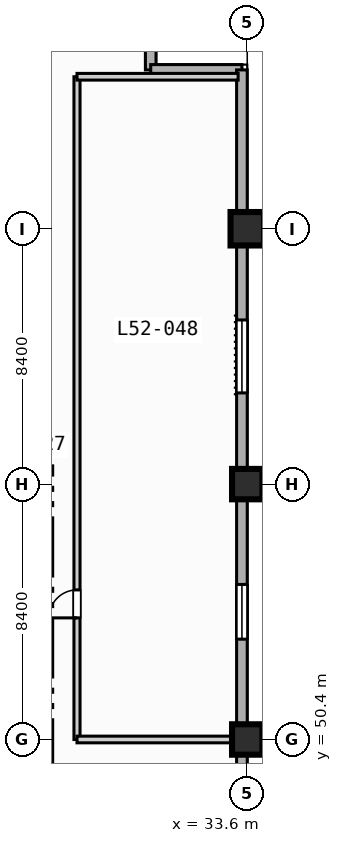
"""IFC4 building model, lengths in metres.
Left out: names, types, materials, properties, quantities, classifications, styles, units other than length and angle.
Written with IfcOpenShell. Run it as: python <this file> out.ifc"""

import sys

from ifc_helpers import new_model, si_unit, direction, frame, frame_2d, origin, origin_2d, place, context, subcontext, project, spatial, rectangle, extrude, element, fill, save


model = new_model("IFC4")
c1 = context("Model", 3, precision=1e-05, world=origin(), true_north=direction((0.0, 1.0)))
c2 = subcontext(c1, "Body", "Model", "MODEL_VIEW")
j1 = project(units=[si_unit("LENGTHUNIT", "METRE"), si_unit("PLANEANGLEUNIT", "RADIAN")], contexts=[c1])
p1 = place(None, origin())
s1 = spatial("IfcSite", under=j1, at=p1, CompositionType="ELEMENT")
p2 = place(p1, origin())
s2 = spatial("IfcBuilding", under=s1, at=p2, CompositionType="ELEMENT")
p3 = place(p2, frame((0.0, 0.0, 212.4)))
s3 = spatial("IfcBuildingStorey", under=s2, at=p3, CompositionType="ELEMENT", Elevation=212.4)
for number, where, z_axis, x_axis in (
    (1, (33.6, 50.4, 0.0), (0.0, 0.0, 1.0), (1.0, 0.0, 0.0)),
    (2, (33.6, 58.8, 0.0), (0.0, 0.0, 1.0), (1.0, 0.0, 0.0)),
):
    element("IfcColumn", number, at=place(p3, frame(where, z_axis=z_axis, x_axis=x_axis)), inside=s3, PredefinedType="COLUMN", context=c2, shape_type="SweptSolid", body=[
        extrude(rectangle(XDim=1.0, YDim=1.0, at=origin_2d()), origin(), (0.0, 0.0, 1.0), 3.7),
    ])
p4 = place(p3, frame((33.6, 67.2, 0.0), z_axis=(0.0, 0.0, 1.0), x_axis=(1.0, 0.0, 0.0)))
e3 = element("IfcColumn", 3, at=p4, inside=s3, PredefinedType="COLUMN", context=c2, shape_type="SweptSolid", body=[
    extrude(rectangle(XDim=1.1, YDim=1.1, at=origin_2d()), origin(), (0.0, 0.0, 1.0), 3.7),
])
for number, where, z_axis, x_axis in (
    (4, (30.425, 75.425, 0.0), (0.0, 0.0, 1.0), (0.0, -1.0, 0.0)),
    (5, (30.425, 72.425, 0.0), (0.0, 0.0, 1.0), (1.0, 0.0, 0.0)),
):
    element("IfcWall", number, at=place(p3, frame(where, z_axis=z_axis, x_axis=x_axis)), inside=s3, PredefinedType="STANDARD", context=c2, shape_type="SweptSolid", body=[
        extrude(rectangle(XDim=3.0, YDim=0.35, at=frame_2d((1.5, 0.0))), origin(), (0.0, 0.0, 1.0), 3.47),
    ])
p5 = place(p3, frame((33.425, 72.425, 0.0), z_axis=(0.0, 0.0, 1.0), x_axis=(0.0, -1.0, 0.0)))
e6 = element("IfcWall", 6, at=p5, inside=s3, PredefinedType="STANDARD", context=c2, shape_type="SweptSolid", body=[
    extrude(rectangle(XDim=39.0, YDim=0.35, at=frame_2d((19.5, 0.0))), origin(), (0.0, 0.0, 1.0), 3.47),
])
p6 = place(p5, frame((33.725, 0.0, 0.85)))
e7 = element("IfcOpeningElement", 7, at=p6, cuts=e6, PredefinedType="OPENING", context=c2, shape_type="SweptSolid", body=[
    extrude(rectangle(XDim=1.8, YDim=1.8, at=frame_2d((0.9, 0.9))), frame((0.0, 0.185, 0.0), z_axis=(0.0, -1.0, 0.0), x_axis=(1.0, 0.0, 0.0)), (0.0, 0.0, 1.0), 0.37),
])
p7 = place(p5, frame((16.925, 0.0, 0.85)))
e8 = element("IfcOpeningElement", 8, at=p7, cuts=e6, PredefinedType="OPENING", context=c2, shape_type="SweptSolid", body=[
    extrude(rectangle(XDim=1.8, YDim=1.8, at=frame_2d((0.9, 0.9))), frame((0.0, 0.185, 0.0), z_axis=(0.0, -1.0, 0.0), x_axis=(1.0, 0.0, 0.0)), (0.0, 0.0, 1.0), 0.37),
])
p8 = place(p5, frame((8.225, 0.0, 0.85)))
e9 = element("IfcOpeningElement", 9, at=p8, cuts=e6, PredefinedType="OPENING", context=c2, shape_type="SweptSolid", body=[
    extrude(rectangle(XDim=2.4, YDim=1.95, at=frame_2d((1.2, 0.975))), frame((0.0, 0.185, 0.0), z_axis=(0.0, -1.0, 0.0), x_axis=(1.0, 0.0, 0.0)), (0.0, 0.0, 1.0), 0.37),
])
p9 = place(p3, frame((28.0, 50.4, 0.0), z_axis=(0.0, 0.0, 1.0), x_axis=(0.0, 1.0, 0.0)))
e10 = element("IfcWall", 10, at=p9, inside=s3, PredefinedType="PARTITIONING", context=c2, shape_type="SweptSolid", body=[
    extrude(rectangle(XDim=21.8, YDim=0.2, at=frame_2d((10.9, 0.0))), origin(), (0.0, 0.0, 1.0), 3.47),
])
p10 = place(p9, frame((4.0, 0.0, 0.0)))
e11 = element("IfcOpeningElement", 11, at=p10, cuts=e10, PredefinedType="OPENING", context=c2, shape_type="SweptSolid", body=[
    extrude(rectangle(XDim=0.92, YDim=2.1, at=frame_2d((0.46, 1.05))), frame((0.0, 0.11, 0.0), z_axis=(0.0, -1.0, 0.0), x_axis=(1.0, 0.0, 0.0)), (0.0, 0.0, 1.0), 0.22),
])
p11 = place(p3, frame((28.0, 50.4, 0.0), z_axis=(0.0, 0.0, 1.0), x_axis=(1.0, 0.0, 0.0)))
e12 = element("IfcWall", 12, at=p11, inside=s3, PredefinedType="PARTITIONING", context=c2, shape_type="SweptSolid", body=[
    extrude(rectangle(XDim=5.3, YDim=0.22, at=frame_2d((2.65, 0.0))), origin(), (0.0, 0.0, 1.0), 2.931),
])
p12 = place(p3, frame((28.0, 72.2, 0.0), z_axis=(0.0, 0.0, 1.0), x_axis=(1.0, 0.0, 0.0)))
e13 = element("IfcWall", 13, at=p12, inside=s3, PredefinedType="PARTITIONING", context=c2, shape_type="SweptSolid", body=[
    extrude(rectangle(XDim=5.3, YDim=0.22, at=frame_2d((2.65, 0.0))), origin(), (0.0, 0.0, 1.0), 3.47),
])
p13 = place(p7, origin())
e14 = element("IfcWindow", 14, at=p13, inside=s3, PartitioningType="SINGLE_PANEL", PredefinedType="WINDOW", context=c2, shape_type="SweptSolid", body=[
    extrude(rectangle(XDim=1.8, YDim=1.8, at=frame_2d((0.9, 0.9))), frame((0.0, 0.03, 0.0), z_axis=(0.0, -1.0, 0.0), x_axis=(1.0, 0.0, 0.0)), (0.0, 0.0, 1.0), 0.06),
])
fill(e8, e14)
p14 = place(p8, origin())
e15 = element("IfcWindow", 15, at=p14, inside=s3, PartitioningType="SINGLE_PANEL", PredefinedType="WINDOW", context=c2, shape_type="SweptSolid", body=[
    extrude(rectangle(XDim=2.4, YDim=1.95, at=frame_2d((1.2, 0.975))), frame((0.0, 0.03, 0.0), z_axis=(0.0, -1.0, 0.0), x_axis=(1.0, 0.0, 0.0)), (0.0, 0.0, 1.0), 0.06),
])
fill(e9, e15)
p15 = place(p10, origin())
e16 = element("IfcDoor", 16, at=p15, inside=s3, OperationType="SINGLE_SWING_LEFT", PredefinedType="DOOR", context=c2, shape_type="SweptSolid", body=[
    extrude(rectangle(XDim=0.92, YDim=2.1, at=frame_2d((0.46, 1.05))), frame((0.0, 0.025, 0.0), z_axis=(0.0, -1.0, 0.0), x_axis=(1.0, 0.0, 0.0)), (0.0, 0.0, 1.0), 0.05),
])
fill(e11, e16)
save(model, sys.argv[1])
